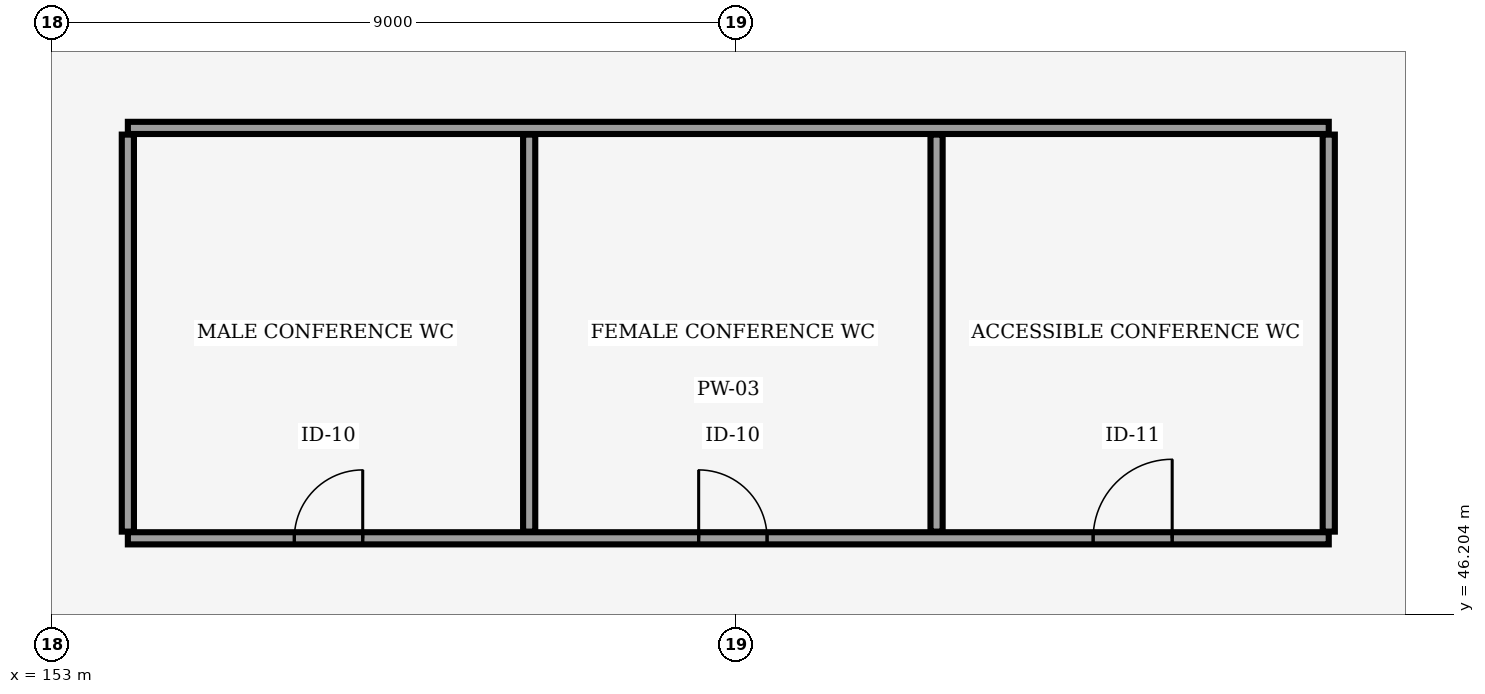
"""IFC4 building model, lengths in metres.
Left out: names, types, materials, properties, quantities, classifications, styles, units other than length and angle.
Written with IfcOpenShell. Run it as: python <this file> out.ifc"""

import sys

from ifc_helpers import new_model, si_unit, direction, frame, frame_2d, origin, place, context, subcontext, project, spatial, rectangle, extrude, element, fill, save


model = new_model("IFC4")
c1 = context("Model", 3, precision=1e-05, world=origin(), true_north=direction((0.0, 1.0)))
c2 = subcontext(c1, "Body", "Model", "MODEL_VIEW")
j1 = project(units=[si_unit("LENGTHUNIT", "METRE"), si_unit("PLANEANGLEUNIT", "RADIAN")], contexts=[c1])
p1 = place(None, origin())
s1 = spatial("IfcSite", under=j1, at=p1, CompositionType="ELEMENT")
p2 = place(p1, origin())
s2 = spatial("IfcBuilding", under=s1, at=p2, CompositionType="ELEMENT")
p3 = place(p2, frame((0.0, 0.0, 18.0)))
s3 = spatial("IfcBuildingStorey", under=s2, at=p3, CompositionType="ELEMENT", Elevation=18.0)
p4 = place(p3, frame((154.0, 47.2, 0.0), z_axis=(0.0, 0.0, 1.0), x_axis=(1.0, 0.0, 0.0)))
e1 = element("IfcWall", 1, at=p4, inside=s3, PredefinedType="PLUMBINGWALL", context=c2, shape_type="SweptSolid", body=[
    extrude(rectangle(XDim=15.8, YDim=0.16, at=frame_2d((7.9, 0.0))), origin(), (0.0, 0.0, 1.0), 3.6),
])
p5 = place(p4, frame((2.19, 0.0, 0.0)))
e2 = element("IfcOpeningElement", 2, at=p5, cuts=e1, PredefinedType="OPENING", context=c2, shape_type="SweptSolid", body=[
    extrude(rectangle(XDim=0.9, YDim=2.1, at=frame_2d((0.45, 1.05))), frame((0.0, 0.09, 0.0), z_axis=(0.0, -1.0, 0.0), x_axis=(1.0, 0.0, 0.0)), (0.0, 0.0, 1.0), 0.18),
])
p6 = place(p4, frame((7.51, 0.0, 0.0)))
e3 = element("IfcOpeningElement", 3, at=p6, cuts=e1, PredefinedType="OPENING", context=c2, shape_type="SweptSolid", body=[
    extrude(rectangle(XDim=0.9, YDim=2.1, at=frame_2d((0.45, 1.05))), frame((0.0, 0.09, 0.0), z_axis=(0.0, -1.0, 0.0), x_axis=(1.0, 0.0, 0.0)), (0.0, 0.0, 1.0), 0.18),
])
p7 = place(p4, frame((12.7, 0.0, 0.0)))
e4 = element("IfcOpeningElement", 4, at=p7, cuts=e1, PredefinedType="OPENING", context=c2, shape_type="SweptSolid", body=[
    extrude(rectangle(XDim=1.04, YDim=2.15, at=frame_2d((0.52, 1.075))), frame((0.0, 0.09, 0.0), z_axis=(0.0, -1.0, 0.0), x_axis=(1.0, 0.0, 0.0)), (0.0, 0.0, 1.0), 0.18),
])
p8 = place(p3, frame((154.0, 52.6, 0.0), z_axis=(0.0, 0.0, 1.0), x_axis=(1.0, 0.0, 0.0)))
e5 = element("IfcWall", 5, at=p8, inside=s3, PredefinedType="PLUMBINGWALL", context=c2, shape_type="SweptSolid", body=[
    extrude(rectangle(XDim=15.8, YDim=0.16, at=frame_2d((7.9, 0.0))), origin(), (0.0, 0.0, 1.0), 3.6),
])
for number, where, z_axis, x_axis in (
    (6, (154.0, 47.288, 0.0), (0.0, 0.0, 1.0), (0.0, 1.0, 0.0)),
    (7, (159.28, 47.288, 0.0), (0.0, 0.0, 1.0), (0.0, 1.0, 0.0)),
    (8, (164.64, 47.288, 0.0), (0.0, 0.0, 1.0), (0.0, 1.0, 0.0)),
    (9, (169.8, 47.288, 0.0), (0.0, 0.0, 1.0), (0.0, 1.0, 0.0)),
):
    element("IfcWall", number, at=place(p3, frame(where, z_axis=z_axis, x_axis=x_axis)), inside=s3, PredefinedType="PLUMBINGWALL", context=c2, shape_type="SweptSolid", body=[
        extrude(rectangle(XDim=5.224, YDim=0.16, at=frame_2d((2.612, 0.0))), origin(), (0.0, 0.0, 1.0), 3.6),
    ])
p9 = place(p5, origin())
e10 = element("IfcDoor", 10, at=p9, inside=s3, OperationType="SINGLE_SWING_RIGHT", PredefinedType="DOOR", context=c2, shape_type="SweptSolid", body=[
    extrude(rectangle(XDim=0.9, YDim=2.1, at=frame_2d((0.45, 1.05))), frame((0.0, 0.025, 0.0), z_axis=(0.0, -1.0, 0.0), x_axis=(1.0, 0.0, 0.0)), (0.0, 0.0, 1.0), 0.05),
])
fill(e2, e10)
p10 = place(p6, origin())
e11 = element("IfcDoor", 11, at=p10, inside=s3, OperationType="SINGLE_SWING_LEFT", PredefinedType="DOOR", context=c2, shape_type="SweptSolid", body=[
    extrude(rectangle(XDim=0.9, YDim=2.1, at=frame_2d((0.45, 1.05))), frame((0.0, 0.025, 0.0), z_axis=(0.0, -1.0, 0.0), x_axis=(1.0, 0.0, 0.0)), (0.0, 0.0, 1.0), 0.05),
])
fill(e3, e11)
p11 = place(p7, origin())
e12 = element("IfcDoor", 12, at=p11, inside=s3, OperationType="SINGLE_SWING_RIGHT", PredefinedType="DOOR", context=c2, shape_type="SweptSolid", body=[
    extrude(rectangle(XDim=1.04, YDim=2.15, at=frame_2d((0.52, 1.075))), frame((0.0, 0.025, 0.0), z_axis=(0.0, -1.0, 0.0), x_axis=(1.0, 0.0, 0.0)), (0.0, 0.0, 1.0), 0.05),
])
fill(e4, e12)
save(model, sys.argv[1])
